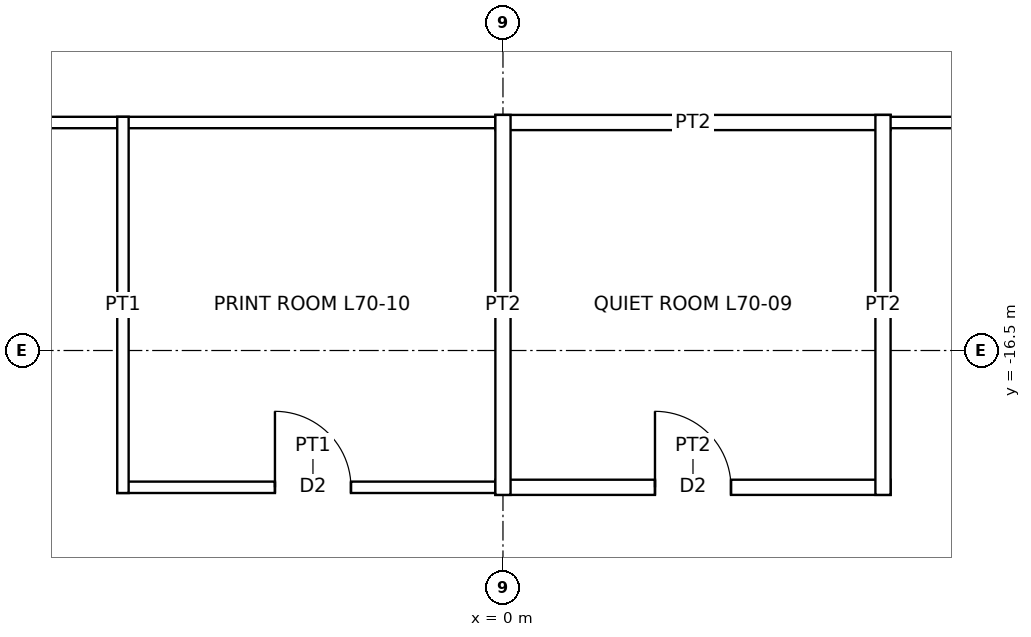
"""IFC4 building model, lengths in metres.
Left out: names, types, materials, properties, quantities, classifications, styles, units other than length and angle.
Written with IfcOpenShell. Run it as: python <this file> out.ifc"""

import sys

from ifc_helpers import new_model, si_unit, direction, frame, frame_2d, origin, place, context, subcontext, project, spatial, rectangle, extrude, element, fill, save


model = new_model("IFC4")
c1 = context("Model", 3, precision=1e-05, world=origin(), true_north=direction((0.0, 1.0)))
c2 = subcontext(c1, "Body", "Model", "MODEL_VIEW")
j1 = project(units=[si_unit("LENGTHUNIT", "METRE"), si_unit("PLANEANGLEUNIT", "RADIAN")], contexts=[c1])
p1 = place(None, origin())
s1 = spatial("IfcSite", under=j1, at=p1, CompositionType="ELEMENT")
p2 = place(p1, origin())
s2 = spatial("IfcBuilding", under=s1, at=p2, CompositionType="ELEMENT")
p3 = place(p2, frame((0.0, 0.0, 315.9)))
s3 = spatial("IfcBuildingStorey", under=s2, at=p3, CompositionType="ELEMENT", Elevation=315.9)
p4 = place(p3, frame((-5.075, -18.3, 0.0), z_axis=(0.0, 0.0, 1.0), x_axis=(1.0, 0.0, 0.0)))
e1 = element("IfcWall", 1, at=p4, inside=s3, PredefinedType="PARTITIONING", context=c2, shape_type="SweptSolid", body=[
    extrude(rectangle(XDim=5.15, YDim=0.15, at=frame_2d((2.575, 0.0))), origin(), (0.0, 0.0, 1.0), 3.85),
])
p5 = place(p4, frame((2.075, 0.0, 0.0)))
e2 = element("IfcOpeningElement", 2, at=p5, cuts=e1, PredefinedType="OPENING", context=c2, shape_type="SweptSolid", body=[
    extrude(rectangle(XDim=1.0, YDim=2.1, at=frame_2d((0.5, 1.05))), frame((0.0, 0.085, 0.0), z_axis=(0.0, -1.0, 0.0), x_axis=(1.0, 0.0, 0.0)), (0.0, 0.0, 1.0), 0.17),
])
p6 = place(p3, frame((-0.1, -18.3, 0.0), z_axis=(0.0, 0.0, 1.0), x_axis=(1.0, 0.0, 0.0)))
e3 = element("IfcWall", 3, at=p6, inside=s3, PredefinedType="PARTITIONING", context=c2, shape_type="SweptSolid", body=[
    extrude(rectangle(XDim=5.2, YDim=0.2, at=frame_2d((2.6, 0.0))), origin(), (0.0, 0.0, 1.0), 3.85),
])
p7 = place(p6, frame((2.1, 0.0, 0.0)))
e4 = element("IfcOpeningElement", 4, at=p7, cuts=e3, PredefinedType="OPENING", context=c2, shape_type="SweptSolid", body=[
    extrude(rectangle(XDim=1.0, YDim=2.1, at=frame_2d((0.5, 1.05))), frame((0.0, 0.11, 0.0), z_axis=(0.0, -1.0, 0.0), x_axis=(1.0, 0.0, 0.0)), (0.0, 0.0, 1.0), 0.22),
])
p8 = place(p3, frame((-13.575, -13.5, 0.0), z_axis=(0.0, 0.0, 1.0), x_axis=(1.0, 0.0, 0.0)))
e5 = element("IfcWall", 5, at=p8, inside=s3, PredefinedType="PARTITIONING", context=c2, shape_type="SweptSolid", body=[
    extrude(rectangle(XDim=13.65, YDim=0.15, at=frame_2d((6.825, 0.0))), origin(), (0.0, 0.0, 1.0), 3.85),
])
p9 = place(p8, frame((3.825, 0.0, 0.0)))
e6 = element("IfcOpeningElement", 6, at=p9, cuts=e5, PredefinedType="OPENING", context=c2, shape_type="SweptSolid", body=[
    extrude(rectangle(XDim=1.0, YDim=2.4, at=frame_2d((0.5, 1.2))), frame((0.0, 0.085, 0.0), z_axis=(0.0, -1.0, 0.0), x_axis=(1.0, 0.0, 0.0)), (0.0, 0.0, 1.0), 0.17),
])
p10 = place(p3, frame((-0.1, -13.5, 0.0), z_axis=(0.0, 0.0, 1.0), x_axis=(1.0, 0.0, 0.0)))
e7 = element("IfcWall", 7, at=p10, inside=s3, PredefinedType="PARTITIONING", context=c2, shape_type="SweptSolid", body=[
    extrude(rectangle(XDim=5.2, YDim=0.2, at=frame_2d((2.6, 0.0))), origin(), (0.0, 0.0, 1.0), 3.85),
])
p11 = place(p3, frame((4.925, -13.5, 0.0), z_axis=(0.0, 0.0, 1.0), x_axis=(1.0, 0.0, 0.0)))
e8 = element("IfcWall", 8, at=p11, inside=s3, PredefinedType="PARTITIONING", context=c2, shape_type="SweptSolid", body=[
    extrude(rectangle(XDim=7.15, YDim=0.15, at=frame_2d((3.575, 0.0))), origin(), (0.0, 0.0, 1.0), 3.85),
])
p12 = place(p3, frame((-5.0, -18.375, 0.0), z_axis=(0.0, 0.0, 1.0), x_axis=(0.0, 1.0, 0.0)))
e9 = element("IfcWall", 9, at=p12, inside=s3, PredefinedType="PARTITIONING", context=c2, shape_type="SweptSolid", body=[
    extrude(rectangle(XDim=4.95, YDim=0.15, at=frame_2d((2.475, 0.0))), origin(), (0.0, 0.0, 1.0), 3.85),
])
p13 = place(p3, frame((0.0, -18.4, 0.0), z_axis=(0.0, 0.0, 1.0), x_axis=(0.0, 1.0, 0.0)))
e10 = element("IfcWall", 10, at=p13, inside=s3, PredefinedType="PARTITIONING", context=c2, shape_type="SweptSolid", body=[
    extrude(rectangle(XDim=5.0, YDim=0.2, at=frame_2d((2.5, 0.0))), origin(), (0.0, 0.0, 1.0), 3.243),
])
p14 = place(p3, frame((5.0, -18.4, 0.0), z_axis=(0.0, 0.0, 1.0), x_axis=(0.0, 1.0, 0.0)))
e11 = element("IfcWall", 11, at=p14, inside=s3, PredefinedType="PARTITIONING", context=c2, shape_type="SweptSolid", body=[
    extrude(rectangle(XDim=5.0, YDim=0.2, at=frame_2d((2.5, 0.0))), origin(), (0.0, 0.0, 1.0), 3.85),
])
p15 = place(p7, origin())
e12 = element("IfcDoor", 12, at=p15, inside=s3, OperationType="SINGLE_SWING_LEFT", PredefinedType="DOOR", context=c2, shape_type="SweptSolid", body=[
    extrude(rectangle(XDim=1.0, YDim=2.1, at=frame_2d((0.5, 1.05))), frame((0.0, 0.025, 0.0), z_axis=(0.0, -1.0, 0.0), x_axis=(1.0, 0.0, 0.0)), (0.0, 0.0, 1.0), 0.05),
])
fill(e4, e12)
p16 = place(p5, origin())
e13 = element("IfcDoor", 13, at=p16, inside=s3, OperationType="SINGLE_SWING_LEFT", PredefinedType="DOOR", context=c2, shape_type="SweptSolid", body=[
    extrude(rectangle(XDim=1.0, YDim=2.1, at=frame_2d((0.5, 1.05))), frame((0.0, 0.025, 0.0), z_axis=(0.0, -1.0, 0.0), x_axis=(1.0, 0.0, 0.0)), (0.0, 0.0, 1.0), 0.05),
])
fill(e2, e13)
save(model, sys.argv[1])
